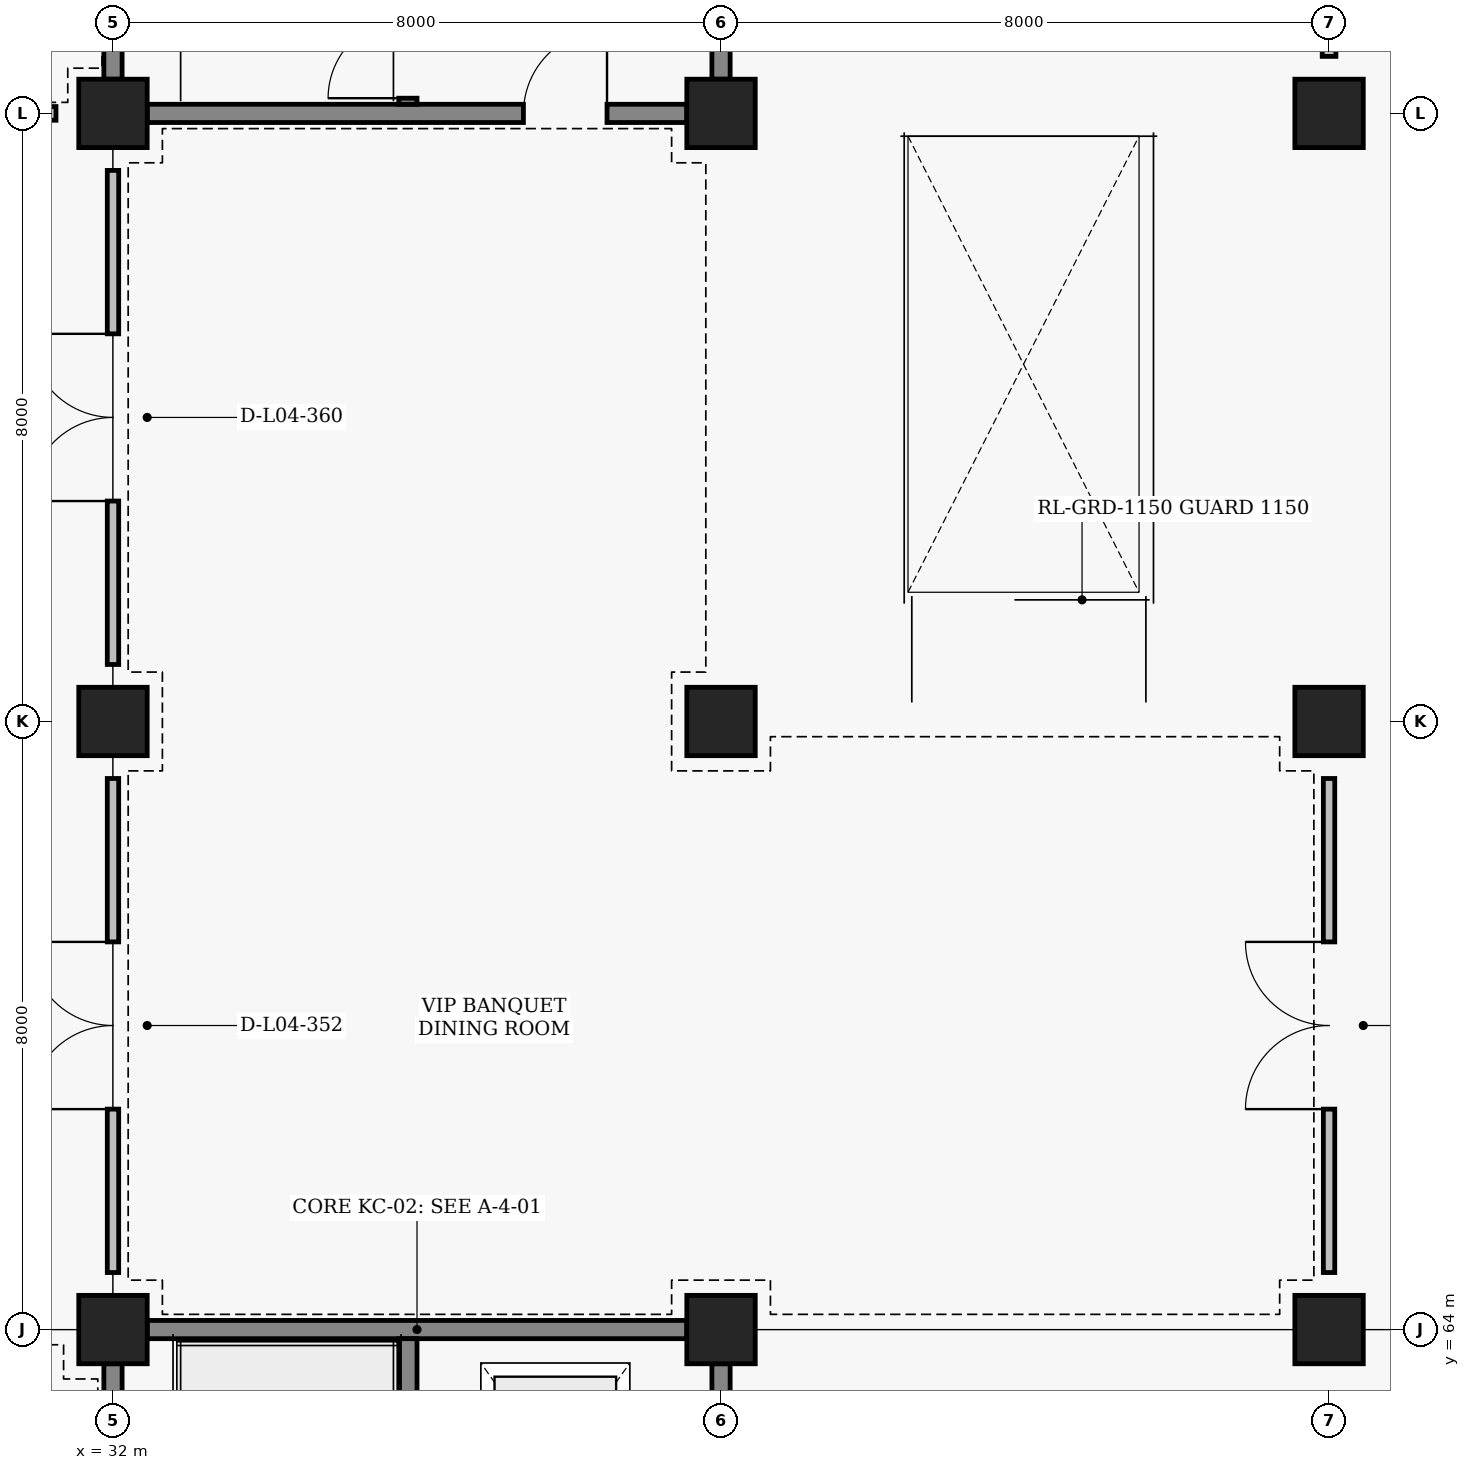
"""IFC4 building model, lengths in metres.
Left out: names, types, materials, properties, quantities, classifications, styles, units other than length and angle.
Written with IfcOpenShell. Run it as: python <this file> out.ifc"""

import sys

from ifc_helpers import new_model, si_unit, direction, frame, frame_2d, origin, origin_2d, place, context, subcontext, project, spatial, rectangle, extrude, element, fill, save


model = new_model("IFC4")
c1 = context("Model", 3, precision=1e-05, world=origin(), true_north=direction((0.0, 1.0)))
c2 = subcontext(c1, "Body", "Model", "MODEL_VIEW")
j1 = project(units=[si_unit("LENGTHUNIT", "METRE"), si_unit("PLANEANGLEUNIT", "RADIAN")], contexts=[c1])
p1 = place(None, origin())
s1 = spatial("IfcSite", under=j1, at=p1, CompositionType="ELEMENT")
p2 = place(p1, origin())
s2 = spatial("IfcBuilding", under=s1, at=p2, CompositionType="ELEMENT")
p3 = place(p2, frame((0.0, 0.0, 14.4)))
s3 = spatial("IfcBuildingStorey", under=s2, at=p3, CompositionType="ELEMENT", Elevation=14.4)
for number, where, z_axis, x_axis in (
    (1, (32.0, 64.0, 0.0), (0.0, 0.0, 1.0), (1.0, 0.0, 0.0)),
    (2, (32.0, 72.0, 0.0), (0.0, 0.0, 1.0), (1.0, 0.0, 0.0)),
    (3, (32.0, 80.0, 0.0), (0.0, 0.0, 1.0), (1.0, 0.0, 0.0)),
    (4, (40.0, 64.0, 0.0), (0.0, 0.0, 1.0), (1.0, 0.0, 0.0)),
    (5, (40.0, 72.0, 0.0), (0.0, 0.0, 1.0), (1.0, 0.0, 0.0)),
    (6, (40.0, 80.0, 0.0), (0.0, 0.0, 1.0), (1.0, 0.0, 0.0)),
    (7, (48.0, 64.0, 0.0), (0.0, 0.0, 1.0), (1.0, 0.0, 0.0)),
    (8, (48.0, 72.0, 0.0), (0.0, 0.0, 1.0), (1.0, 0.0, 0.0)),
    (9, (48.0, 80.0, 0.0), (0.0, 0.0, 1.0), (1.0, 0.0, 0.0)),
):
    element("IfcColumn", number, at=place(p3, frame(where, z_axis=z_axis, x_axis=x_axis)), inside=s3, PredefinedType="COLUMN", context=c2, shape_type="SweptSolid", body=[
        extrude(rectangle(XDim=0.9, YDim=0.9, at=origin_2d()), origin(), (0.0, 0.0, 1.0), 4.2),
    ])
for number, where, z_axis, x_axis in (
    (10, (32.45, 64.0, 0.0), (0.0, 0.0, 1.0), (1.0, 0.0, 0.0)),
    (11, (32.0, 56.45, 0.0), (0.0, 0.0, 1.0), (0.0, 1.0, 0.0)),
    (12, (40.0, 56.45, 0.0), (0.0, 0.0, 1.0), (0.0, 1.0, 0.0)),
):
    element("IfcWall", number, at=place(p3, frame(where, z_axis=z_axis, x_axis=x_axis)), inside=s3, PredefinedType="SHEAR", context=c2, shape_type="SweptSolid", body=[
        extrude(rectangle(XDim=7.1, YDim=0.24, at=frame_2d((3.55, 0.0))), origin(), (0.0, 0.0, 1.0), 3.33),
    ])
p4 = place(p3, frame((35.88, 56.12, 0.0), z_axis=(0.0, 0.0, 1.0), x_axis=(0.0, 1.0, 0.0)))
e13 = element("IfcWall", 13, at=p4, inside=s3, PredefinedType="SHEAR", context=c2, shape_type="SweptSolid", body=[
    extrude(rectangle(XDim=7.76, YDim=0.24, at=frame_2d((3.88, 0.0))), origin(), (0.0, 0.0, 1.0), 3.43),
])
p5 = place(p4, frame((0.08, 0.0, 0.0)))
e14 = element("IfcOpeningElement", 14, at=p5, cuts=e13, PredefinedType="OPENING", context=c2, shape_type="SweptSolid", body=[
    extrude(rectangle(XDim=1.05, YDim=2.15, at=frame_2d((0.525, 1.075))), frame((0.0, 0.13, 0.0), z_axis=(0.0, -1.0, 0.0), x_axis=(1.0, 0.0, 0.0)), (0.0, 0.0, 1.0), 0.26),
])
p6 = place(p3, frame((32.45, 80.0, 0.0), z_axis=(0.0, 0.0, 1.0), x_axis=(1.0, 0.0, 0.0)))
e15 = element("IfcWall", 15, at=p6, inside=s3, PredefinedType="SHEAR", context=c2, shape_type="SweptSolid", body=[
    extrude(rectangle(XDim=7.1, YDim=0.24, at=frame_2d((3.55, 0.0))), origin(), (0.0, 0.0, 1.0), 3.33),
])
p7 = place(p6, frame((4.95, 0.0, 0.0)))
e16 = element("IfcOpeningElement", 16, at=p7, cuts=e15, PredefinedType="OPENING", context=c2, shape_type="SweptSolid", body=[
    extrude(rectangle(XDim=1.1, YDim=2.2, at=frame_2d((0.55, 1.1))), frame((0.0, 0.13, 0.0), z_axis=(0.0, -1.0, 0.0), x_axis=(1.0, 0.0, 0.0)), (0.0, 0.0, 1.0), 0.26),
])
for number, where, z_axis, x_axis in (
    (17, (32.0, 80.45, 0.0), (0.0, 0.0, 1.0), (0.0, 1.0, 0.0)),
    (18, (40.0, 80.45, 0.0), (0.0, 0.0, 1.0), (0.0, 1.0, 0.0)),
):
    element("IfcWall", number, at=place(p3, frame(where, z_axis=z_axis, x_axis=x_axis)), inside=s3, PredefinedType="SHEAR", context=c2, shape_type="SweptSolid", body=[
        extrude(rectangle(XDim=7.1, YDim=0.24, at=frame_2d((3.55, 0.0))), origin(), (0.0, 0.0, 1.0), 3.33),
    ])
p8 = place(p3, frame((35.88, 80.12, 0.0), z_axis=(0.0, 0.0, 1.0), x_axis=(0.0, 1.0, 0.0)))
e19 = element("IfcWall", 19, at=p8, inside=s3, PredefinedType="SHEAR", context=c2, shape_type="SweptSolid", body=[
    extrude(rectangle(XDim=7.76, YDim=0.24, at=frame_2d((3.88, 0.0))), origin(), (0.0, 0.0, 1.0), 3.43),
])
p9 = place(p8, frame((0.08, 0.0, 0.0)))
e20 = element("IfcOpeningElement", 20, at=p9, cuts=e19, PredefinedType="OPENING", context=c2, shape_type="SweptSolid", body=[
    extrude(rectangle(XDim=1.05, YDim=2.15, at=frame_2d((0.525, 1.075))), frame((0.0, 0.13, 0.0), z_axis=(0.0, -1.0, 0.0), x_axis=(1.0, 0.0, 0.0)), (0.0, 0.0, 1.0), 0.26),
])
p10 = place(p3, frame((32.0, 64.75, 0.0), z_axis=(0.0, 0.0, 1.0), x_axis=(0.0, 1.0, 0.0)))
e21 = element("IfcWall", 21, at=p10, inside=s3, PredefinedType="PARTITIONING", context=c2, shape_type="SweptSolid", body=[
    extrude(rectangle(XDim=6.5, YDim=0.15, at=frame_2d((3.25, 0.0))), origin(), (0.0, 0.0, 1.0), 3.33),
])
p11 = place(p10, frame((2.15, 0.0, 0.0)))
e22 = element("IfcOpeningElement", 22, at=p11, cuts=e21, PredefinedType="OPENING", context=c2, shape_type="SweptSolid", body=[
    extrude(rectangle(XDim=2.2, YDim=2.4, at=frame_2d((1.1, 1.2))), frame((0.0, 0.085, 0.0), z_axis=(0.0, -1.0, 0.0), x_axis=(1.0, 0.0, 0.0)), (0.0, 0.0, 1.0), 0.17),
])
p12 = place(p3, frame((24.75, 80.0, 0.0), z_axis=(0.0, 0.0, 1.0), x_axis=(1.0, 0.0, 0.0)))
e23 = element("IfcWall", 23, at=p12, inside=s3, PredefinedType="PARTITIONING", context=c2, shape_type="SweptSolid", body=[
    extrude(rectangle(XDim=6.5, YDim=0.18, at=frame_2d((3.25, 0.0))), origin(), (0.0, 0.0, 1.0), 3.43),
])
p13 = place(p12, frame((2.5, 0.0, 0.0)))
e24 = element("IfcOpeningElement", 24, at=p13, cuts=e23, PredefinedType="OPENING", context=c2, shape_type="SweptSolid", body=[
    extrude(rectangle(XDim=1.5, YDim=2.2, at=frame_2d((0.75, 1.1))), frame((0.0, 0.1, 0.0), z_axis=(0.0, -1.0, 0.0), x_axis=(1.0, 0.0, 0.0)), (0.0, 0.0, 1.0), 0.2),
])
p14 = place(p3, frame((32.0, 72.75, 0.0), z_axis=(0.0, 0.0, 1.0), x_axis=(0.0, 1.0, 0.0)))
e25 = element("IfcWall", 25, at=p14, inside=s3, PredefinedType="PARTITIONING", context=c2, shape_type="SweptSolid", body=[
    extrude(rectangle(XDim=6.5, YDim=0.15, at=frame_2d((3.25, 0.0))), origin(), (0.0, 0.0, 1.0), 3.33),
])
p15 = place(p14, frame((2.15, 0.0, 0.0)))
e26 = element("IfcOpeningElement", 26, at=p15, cuts=e25, PredefinedType="OPENING", context=c2, shape_type="SweptSolid", body=[
    extrude(rectangle(XDim=2.2, YDim=2.4, at=frame_2d((1.1, 1.2))), frame((0.0, 0.085, 0.0), z_axis=(0.0, -1.0, 0.0), x_axis=(1.0, 0.0, 0.0)), (0.0, 0.0, 1.0), 0.17),
])
p16 = place(p3, frame((48.0, 64.75, 0.0), z_axis=(0.0, 0.0, 1.0), x_axis=(0.0, 1.0, 0.0)))
e27 = element("IfcWall", 27, at=p16, inside=s3, PredefinedType="PARTITIONING", context=c2, shape_type="SweptSolid", body=[
    extrude(rectangle(XDim=6.5, YDim=0.15, at=frame_2d((3.25, 0.0))), origin(), (0.0, 0.0, 1.0), 3.33),
])
p17 = place(p16, frame((2.15, 0.0, 0.0)))
e28 = element("IfcOpeningElement", 28, at=p17, cuts=e27, PredefinedType="OPENING", context=c2, shape_type="SweptSolid", body=[
    extrude(rectangle(XDim=2.2, YDim=2.4, at=frame_2d((1.1, 1.2))), frame((0.0, 0.085, 0.0), z_axis=(0.0, -1.0, 0.0), x_axis=(1.0, 0.0, 0.0)), (0.0, 0.0, 1.0), 0.17),
])
p18 = place(p3, frame((48.0, 80.75, 0.0), z_axis=(0.0, 0.0, 1.0), x_axis=(0.0, 1.0, 0.0)))
e29 = element("IfcWall", 29, at=p18, inside=s3, PredefinedType="PARTITIONING", context=c2, shape_type="SweptSolid", body=[
    extrude(rectangle(XDim=6.5, YDim=0.18, at=frame_2d((3.25, 0.0))), origin(), (0.0, 0.0, 1.0), 3.33),
])
p19 = place(p18, frame((2.5, 0.0, 0.0)))
e30 = element("IfcOpeningElement", 30, at=p19, cuts=e29, PredefinedType="OPENING", context=c2, shape_type="SweptSolid", body=[
    extrude(rectangle(XDim=1.5, YDim=2.2, at=frame_2d((0.75, 1.1))), frame((0.0, 0.1, 0.0), z_axis=(0.0, -1.0, 0.0), x_axis=(1.0, 0.0, 0.0)), (0.0, 0.0, 1.0), 0.2),
])
p20 = place(p7, origin())
e31 = element("IfcDoor", 31, at=p20, inside=s3, OperationType="SINGLE_SWING_RIGHT", PredefinedType="DOOR", context=c2, shape_type="SweptSolid", body=[
    extrude(rectangle(XDim=1.1, YDim=2.2, at=frame_2d((0.55, 1.1))), frame((0.0, 0.025, 0.0), z_axis=(0.0, -1.0, 0.0), x_axis=(1.0, 0.0, 0.0)), (0.0, 0.0, 1.0), 0.05),
])
fill(e16, e31)
p21 = place(p9, origin())
e32 = element("IfcDoor", 32, at=p21, inside=s3, OperationType="SINGLE_SWING_LEFT", PredefinedType="DOOR", context=c2, shape_type="SweptSolid", body=[
    extrude(rectangle(XDim=1.05, YDim=2.15, at=frame_2d((0.525, 1.075))), frame((0.0, 0.025, 0.0), z_axis=(0.0, -1.0, 0.0), x_axis=(1.0, 0.0, 0.0)), (0.0, 0.0, 1.0), 0.05),
])
fill(e20, e32)
p22 = place(p11, origin())
e33 = element("IfcDoor", 33, at=p22, inside=s3, OperationType="DOUBLE_SWING_LEFT", PredefinedType="DOOR", context=c2, shape_type="SweptSolid", body=[
    extrude(rectangle(XDim=2.2, YDim=2.4, at=frame_2d((1.1, 1.2))), frame((0.0, 0.025, 0.0), z_axis=(0.0, -1.0, 0.0), x_axis=(1.0, 0.0, 0.0)), (0.0, 0.0, 1.0), 0.05),
])
fill(e22, e33)
p23 = place(p15, origin())
e34 = element("IfcDoor", 34, at=p23, inside=s3, OperationType="DOUBLE_SWING_LEFT", PredefinedType="DOOR", context=c2, shape_type="SweptSolid", body=[
    extrude(rectangle(XDim=2.2, YDim=2.4, at=frame_2d((1.1, 1.2))), frame((0.0, 0.025, 0.0), z_axis=(0.0, -1.0, 0.0), x_axis=(1.0, 0.0, 0.0)), (0.0, 0.0, 1.0), 0.05),
])
fill(e26, e34)
p24 = place(p17, origin())
e35 = element("IfcDoor", 35, at=p24, inside=s3, OperationType="DOUBLE_SWING_LEFT", PredefinedType="DOOR", context=c2, shape_type="SweptSolid", body=[
    extrude(rectangle(XDim=2.2, YDim=2.4, at=frame_2d((1.1, 1.2))), frame((0.0, 0.025, 0.0), z_axis=(0.0, -1.0, 0.0), x_axis=(1.0, 0.0, 0.0)), (0.0, 0.0, 1.0), 0.05),
])
fill(e28, e35)
save(model, sys.argv[1])
